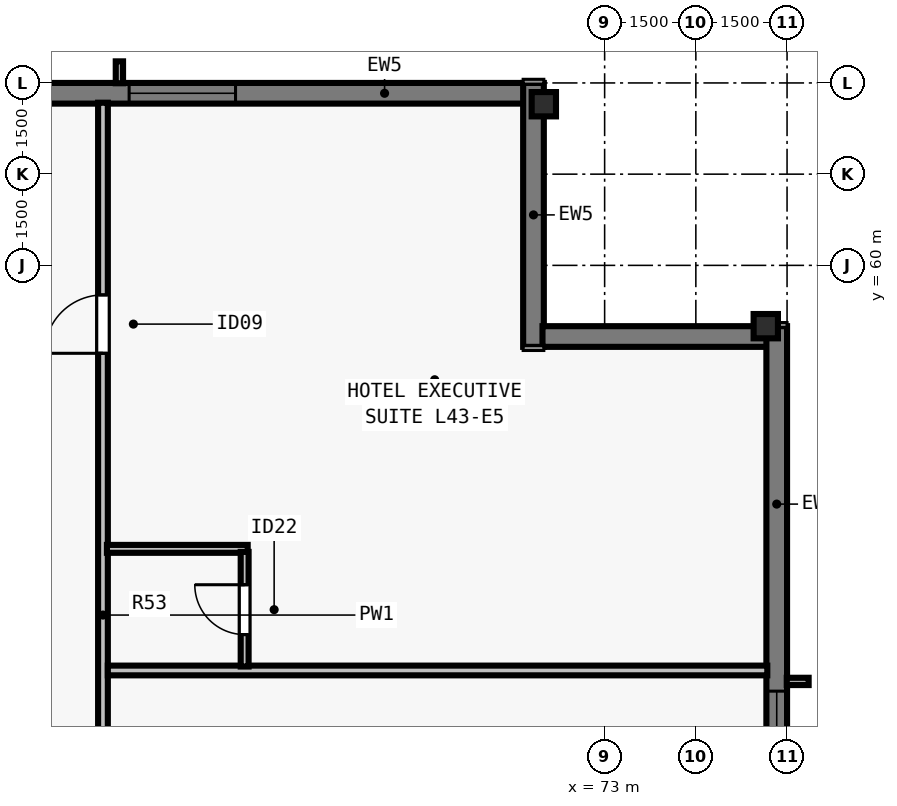
"""IFC4 building model, lengths in metres.
Left out: names, types, materials, properties, quantities, classifications, styles, units other than length and angle.
Written with IfcOpenShell. Run it as: python <this file> out.ifc"""

import sys

from ifc_helpers import new_model, si_unit, direction, frame, frame_2d, origin, origin_2d, place, context, subcontext, project, spatial, rectangle, i_section, extrude, element, fill, save


model = new_model("IFC4")
c1 = context("Model", 3, precision=1e-05, world=origin(), true_north=direction((0.0, 1.0)))
c2 = subcontext(c1, "Body", "Model", "MODEL_VIEW")
j1 = project(units=[si_unit("LENGTHUNIT", "METRE"), si_unit("PLANEANGLEUNIT", "RADIAN")], contexts=[c1])
p1 = place(None, origin())
s1 = spatial("IfcSite", under=j1, at=p1, CompositionType="ELEMENT")
p2 = place(p1, origin())
s2 = spatial("IfcBuilding", under=s1, at=p2, CompositionType="ELEMENT")
p3 = place(p2, frame((0.0, 0.0, 158.5)))
s3 = spatial("IfcBuildingStorey", under=s2, at=p3, CompositionType="ELEMENT", Elevation=158.5)
for number, where, z_axis, x_axis in (
    (1, (75.65, 59.0, 0.0), (0.0, 0.0, 1.0), (0.0, 1.0, 0.0)),
    (2, (72.0, 62.65, 0.0), (0.0, 0.0, 1.0), (1.0, 0.0, 0.0)),
):
    element("IfcColumn", number, at=place(p3, frame(where, z_axis=z_axis, x_axis=x_axis)), inside=s3, PredefinedType="COLUMN", context=c2, shape_type="SweptSolid", body=[
        extrude(i_section(OverallWidth=0.4, OverallDepth=0.4, WebThickness=0.022, FlangeThickness=0.036, at=origin_2d()), origin(), (0.0, 0.0, 1.0), 3.5),
    ])
p4 = place(p3, frame((32.0, 62.83, 0.0), z_axis=(0.0, 0.0, 1.0), x_axis=(1.0, 0.0, 0.0)))
e3 = element("IfcWall", 3, at=p4, inside=s3, PredefinedType="SOLIDWALL", context=c2, shape_type="SweptSolid", body=[
    extrude(rectangle(XDim=39.682, YDim=0.34, at=frame_2d((19.841, 0.0))), origin(), (0.0, 0.0, 1.0), 3.28),
])
p5 = place(p4, frame((3.902, 0.0, 0.8)))
e4 = element("IfcOpeningElement", 4, at=p5, cuts=e3, PredefinedType="OPENING", context=c2, shape_type="SweptSolid", body=[
    extrude(rectangle(XDim=1.75, YDim=1.66, at=frame_2d((0.875, 0.83))), frame((0.0, 0.18, 0.0), z_axis=(0.0, -1.0, 0.0), x_axis=(1.0, 0.0, 0.0)), (0.0, 0.0, 1.0), 0.36),
])
p6 = place(p4, frame((8.955, 0.0, 0.8)))
e5 = element("IfcOpeningElement", 5, at=p6, cuts=e3, PredefinedType="OPENING", context=c2, shape_type="SweptSolid", body=[
    extrude(rectangle(XDim=1.35, YDim=1.66, at=frame_2d((0.675, 0.83))), frame((0.0, 0.18, 0.0), z_axis=(0.0, -1.0, 0.0), x_axis=(1.0, 0.0, 0.0)), (0.0, 0.0, 1.0), 0.36),
])
p7 = place(p4, frame((11.859, 0.0, 0.8)))
e6 = element("IfcOpeningElement", 6, at=p7, cuts=e3, PredefinedType="OPENING", context=c2, shape_type="SweptSolid", body=[
    extrude(rectangle(XDim=1.75, YDim=1.66, at=frame_2d((0.875, 0.83))), frame((0.0, 0.18, 0.0), z_axis=(0.0, -1.0, 0.0), x_axis=(1.0, 0.0, 0.0)), (0.0, 0.0, 1.0), 0.36),
])
p8 = place(p4, frame((16.062, 0.0, 0.8)))
e7 = element("IfcOpeningElement", 7, at=p8, cuts=e3, PredefinedType="OPENING", context=c2, shape_type="SweptSolid", body=[
    extrude(rectangle(XDim=1.35, YDim=1.66, at=frame_2d((0.675, 0.83))), frame((0.0, 0.18, 0.0), z_axis=(0.0, -1.0, 0.0), x_axis=(1.0, 0.0, 0.0)), (0.0, 0.0, 1.0), 0.36),
])
p9 = place(p4, frame((18.966, 0.0, 0.8)))
e8 = element("IfcOpeningElement", 8, at=p9, cuts=e3, PredefinedType="OPENING", context=c2, shape_type="SweptSolid", body=[
    extrude(rectangle(XDim=1.75, YDim=1.66, at=frame_2d((0.875, 0.83))), frame((0.0, 0.18, 0.0), z_axis=(0.0, -1.0, 0.0), x_axis=(1.0, 0.0, 0.0)), (0.0, 0.0, 1.0), 0.36),
])
p10 = place(p4, frame((22.719, 0.0, 0.8)))
e9 = element("IfcOpeningElement", 9, at=p10, cuts=e3, PredefinedType="OPENING", context=c2, shape_type="SweptSolid", body=[
    extrude(rectangle(XDim=1.35, YDim=1.66, at=frame_2d((0.675, 0.83))), frame((0.0, 0.18, 0.0), z_axis=(0.0, -1.0, 0.0), x_axis=(1.0, 0.0, 0.0)), (0.0, 0.0, 1.0), 0.36),
])
p11 = place(p4, frame((26.073, 0.0, 0.8)))
e10 = element("IfcOpeningElement", 10, at=p11, cuts=e3, PredefinedType="OPENING", context=c2, shape_type="SweptSolid", body=[
    extrude(rectangle(XDim=1.75, YDim=1.66, at=frame_2d((0.875, 0.83))), frame((0.0, 0.18, 0.0), z_axis=(0.0, -1.0, 0.0), x_axis=(1.0, 0.0, 0.0)), (0.0, 0.0, 1.0), 0.36),
])
p12 = place(p4, frame((28.977, 0.0, 0.8)))
e11 = element("IfcOpeningElement", 11, at=p12, cuts=e3, PredefinedType="OPENING", context=c2, shape_type="SweptSolid", body=[
    extrude(rectangle(XDim=1.35, YDim=1.66, at=frame_2d((0.675, 0.83))), frame((0.0, 0.18, 0.0), z_axis=(0.0, -1.0, 0.0), x_axis=(1.0, 0.0, 0.0)), (0.0, 0.0, 1.0), 0.36),
])
p13 = place(p4, frame((33.18, 0.0, 0.8)))
e12 = element("IfcOpeningElement", 12, at=p13, cuts=e3, PredefinedType="OPENING", context=c2, shape_type="SweptSolid", body=[
    extrude(rectangle(XDim=1.75, YDim=1.66, at=frame_2d((0.875, 0.83))), frame((0.0, 0.18, 0.0), z_axis=(0.0, -1.0, 0.0), x_axis=(1.0, 0.0, 0.0)), (0.0, 0.0, 1.0), 0.36),
])
p14 = place(p3, frame((71.83, 63.0, 0.0), z_axis=(0.0, 0.0, 1.0), x_axis=(0.0, -1.0, 0.0)))
e13 = element("IfcWall", 13, at=p14, inside=s3, PredefinedType="SOLIDWALL", context=c2, shape_type="SweptSolid", body=[
    extrude(rectangle(XDim=4.34, YDim=0.34, at=frame_2d((2.17, 0.0))), origin(), (0.0, 0.0, 1.0), 3.28),
])
p15 = place(p3, frame((71.978, 58.83, 0.0), z_axis=(0.0, 0.0, 1.0), x_axis=(1.0, 0.0, 0.0)))
e14 = element("IfcWall", 14, at=p15, inside=s3, PredefinedType="SOLIDWALL", context=c2, shape_type="SweptSolid", body=[
    extrude(rectangle(XDim=3.704, YDim=0.34, at=frame_2d((1.852, 0.0))), origin(), (0.0, 0.0, 1.0), 3.28),
])
p16 = place(p3, frame((75.83, 59.0, 0.0), z_axis=(0.0, 0.0, 1.0), x_axis=(0.0, -1.0, 0.0)))
e15 = element("IfcWall", 15, at=p16, inside=s3, PredefinedType="SOLIDWALL", context=c2, shape_type="SweptSolid", body=[
    extrude(rectangle(XDim=39.682, YDim=0.34, at=frame_2d((19.841, 0.0))), origin(), (0.0, 0.0, 1.0), 3.28),
])
p17 = place(p16, frame((6.002, 0.0, 0.8)))
e16 = element("IfcOpeningElement", 16, at=p17, cuts=e15, PredefinedType="OPENING", context=c2, shape_type="SweptSolid", body=[
    extrude(rectangle(XDim=1.75, YDim=1.66, at=frame_2d((0.875, 0.83))), frame((0.0, 0.18, 0.0), z_axis=(0.0, -1.0, 0.0), x_axis=(1.0, 0.0, 0.0)), (0.0, 0.0, 1.0), 0.36),
])
p18 = place(p16, frame((8.505, 0.0, 0.8)))
e17 = element("IfcOpeningElement", 17, at=p18, cuts=e15, PredefinedType="OPENING", context=c2, shape_type="SweptSolid", body=[
    extrude(rectangle(XDim=1.35, YDim=1.66, at=frame_2d((0.675, 0.83))), frame((0.0, 0.18, 0.0), z_axis=(0.0, -1.0, 0.0), x_axis=(1.0, 0.0, 0.0)), (0.0, 0.0, 1.0), 0.36),
])
p19 = place(p16, frame((11.859, 0.0, 0.8)))
e18 = element("IfcOpeningElement", 18, at=p19, cuts=e15, PredefinedType="OPENING", context=c2, shape_type="SweptSolid", body=[
    extrude(rectangle(XDim=1.75, YDim=1.66, at=frame_2d((0.875, 0.83))), frame((0.0, 0.18, 0.0), z_axis=(0.0, -1.0, 0.0), x_axis=(1.0, 0.0, 0.0)), (0.0, 0.0, 1.0), 0.36),
])
p20 = place(p16, frame((16.062, 0.0, 0.8)))
e19 = element("IfcOpeningElement", 19, at=p20, cuts=e15, PredefinedType="OPENING", context=c2, shape_type="SweptSolid", body=[
    extrude(rectangle(XDim=1.35, YDim=1.66, at=frame_2d((0.675, 0.83))), frame((0.0, 0.18, 0.0), z_axis=(0.0, -1.0, 0.0), x_axis=(1.0, 0.0, 0.0)), (0.0, 0.0, 1.0), 0.36),
])
p21 = place(p16, frame((18.966, 0.0, 0.8)))
e20 = element("IfcOpeningElement", 20, at=p21, cuts=e15, PredefinedType="OPENING", context=c2, shape_type="SweptSolid", body=[
    extrude(rectangle(XDim=1.75, YDim=1.66, at=frame_2d((0.875, 0.83))), frame((0.0, 0.18, 0.0), z_axis=(0.0, -1.0, 0.0), x_axis=(1.0, 0.0, 0.0)), (0.0, 0.0, 1.0), 0.36),
])
p22 = place(p16, frame((22.719, 0.0, 0.8)))
e21 = element("IfcOpeningElement", 21, at=p22, cuts=e15, PredefinedType="OPENING", context=c2, shape_type="SweptSolid", body=[
    extrude(rectangle(XDim=1.35, YDim=1.66, at=frame_2d((0.675, 0.83))), frame((0.0, 0.18, 0.0), z_axis=(0.0, -1.0, 0.0), x_axis=(1.0, 0.0, 0.0)), (0.0, 0.0, 1.0), 0.36),
])
p23 = place(p16, frame((26.073, 0.0, 0.8)))
e22 = element("IfcOpeningElement", 22, at=p23, cuts=e15, PredefinedType="OPENING", context=c2, shape_type="SweptSolid", body=[
    extrude(rectangle(XDim=1.75, YDim=1.66, at=frame_2d((0.875, 0.83))), frame((0.0, 0.18, 0.0), z_axis=(0.0, -1.0, 0.0), x_axis=(1.0, 0.0, 0.0)), (0.0, 0.0, 1.0), 0.36),
])
p24 = place(p16, frame((29.827, 0.0, 0.8)))
e23 = element("IfcOpeningElement", 23, at=p24, cuts=e15, PredefinedType="OPENING", context=c2, shape_type="SweptSolid", body=[
    extrude(rectangle(XDim=1.35, YDim=1.66, at=frame_2d((0.675, 0.83))), frame((0.0, 0.18, 0.0), z_axis=(0.0, -1.0, 0.0), x_axis=(1.0, 0.0, 0.0)), (0.0, 0.0, 1.0), 0.36),
])
p25 = place(p16, frame((32.33, 0.0, 0.8)))
e24 = element("IfcOpeningElement", 24, at=p25, cuts=e15, PredefinedType="OPENING", context=c2, shape_type="SweptSolid", body=[
    extrude(rectangle(XDim=1.75, YDim=1.66, at=frame_2d((0.875, 0.83))), frame((0.0, 0.18, 0.0), z_axis=(0.0, -1.0, 0.0), x_axis=(1.0, 0.0, 0.0)), (0.0, 0.0, 1.0), 0.36),
])
p26 = place(p16, frame((34.79, 0.0, 0.8)))
e25 = element("IfcOpeningElement", 25, at=p26, cuts=e15, PredefinedType="OPENING", context=c2, shape_type="SweptSolid", body=[
    extrude(rectangle(XDim=0.9, YDim=1.66, at=frame_2d((0.45, 0.83))), frame((0.0, 0.18, 0.0), z_axis=(0.0, -1.0, 0.0), x_axis=(1.0, 0.0, 0.0)), (0.0, 0.0, 1.0), 0.36),
])
p27 = place(p3, frame((64.75, 15.325, 0.0), z_axis=(0.0, 0.0, 1.0), x_axis=(0.0, 1.0, 0.0)))
e26 = element("IfcWall", 26, at=p27, inside=s3, PredefinedType="PARTITIONING", context=c2, shape_type="SweptSolid", body=[
    extrude(rectangle(XDim=47.35, YDim=0.16, at=frame_2d((23.675, 0.0))), origin(), (0.0, 0.0, 1.0), 2.555),
])
p28 = place(p27, frame((5.494, 0.0, 0.0)))
e27 = element("IfcOpeningElement", 27, at=p28, cuts=e26, PredefinedType="OPENING", context=c2, shape_type="SweptSolid", body=[
    extrude(rectangle(XDim=0.96, YDim=2.15, at=frame_2d((0.48, 1.075))), frame((0.0, 0.09, 0.0), z_axis=(0.0, -1.0, 0.0), x_axis=(1.0, 0.0, 0.0)), (0.0, 0.0, 1.0), 0.18),
])
p29 = place(p27, frame((14.796, 0.0, 0.0)))
e28 = element("IfcOpeningElement", 28, at=p29, cuts=e26, PredefinedType="OPENING", context=c2, shape_type="SweptSolid", body=[
    extrude(rectangle(XDim=0.96, YDim=2.15, at=frame_2d((0.48, 1.075))), frame((0.0, 0.09, 0.0), z_axis=(0.0, -1.0, 0.0), x_axis=(1.0, 0.0, 0.0)), (0.0, 0.0, 1.0), 0.18),
])
p30 = place(p27, frame((24.228, 0.0, 0.0)))
e29 = element("IfcOpeningElement", 29, at=p30, cuts=e26, PredefinedType="OPENING", context=c2, shape_type="SweptSolid", body=[
    extrude(rectangle(XDim=0.96, YDim=2.15, at=frame_2d((0.48, 1.075))), frame((0.0, 0.09, 0.0), z_axis=(0.0, -1.0, 0.0), x_axis=(1.0, 0.0, 0.0)), (0.0, 0.0, 1.0), 0.18),
])
p31 = place(p27, frame((33.66, 0.0, 0.0)))
e30 = element("IfcOpeningElement", 30, at=p31, cuts=e26, PredefinedType="OPENING", context=c2, shape_type="SweptSolid", body=[
    extrude(rectangle(XDim=0.96, YDim=2.15, at=frame_2d((0.48, 1.075))), frame((0.0, 0.09, 0.0), z_axis=(0.0, -1.0, 0.0), x_axis=(1.0, 0.0, 0.0)), (0.0, 0.0, 1.0), 0.18),
])
p32 = place(p27, frame((43.229, 0.0, 0.0)))
e31 = element("IfcOpeningElement", 31, at=p32, cuts=e26, PredefinedType="OPENING", context=c2, shape_type="SweptSolid", body=[
    extrude(rectangle(XDim=0.96, YDim=2.15, at=frame_2d((0.48, 1.075))), frame((0.0, 0.09, 0.0), z_axis=(0.0, -1.0, 0.0), x_axis=(1.0, 0.0, 0.0)), (0.0, 0.0, 1.0), 0.18),
])
p33 = place(p3, frame((64.83, 53.338, 0.0), z_axis=(0.0, 0.0, 1.0), x_axis=(1.0, 0.0, 0.0)))
e32 = element("IfcWall", 32, at=p33, inside=s3, PredefinedType="PARTITIONING", context=c2, shape_type="SweptSolid", body=[
    extrude(rectangle(XDim=10.845, YDim=0.16, at=frame_2d((5.422, 0.0))), origin(), (0.0, 0.0, 1.0), 2.896),
])
p34 = place(p3, frame((64.815, 55.338, 0.0), z_axis=(0.0, 0.0, 1.0), x_axis=(1.0, 0.0, 0.0)))
e33 = element("IfcWall", 33, at=p34, inside=s3, PredefinedType="PLUMBINGWALL", context=c2, shape_type="SweptSolid", body=[
    extrude(rectangle(XDim=2.315, YDim=0.13, at=frame_2d((1.157, 0.0))), origin(), (0.0, 0.0, 1.0), 3.28),
])
p35 = place(p3, frame((67.08, 53.403, 0.0), z_axis=(0.0, 0.0, 1.0), x_axis=(0.0, 1.0, 0.0)))
e34 = element("IfcWall", 34, at=p35, inside=s3, PredefinedType="PLUMBINGWALL", context=c2, shape_type="SweptSolid", body=[
    extrude(rectangle(XDim=1.885, YDim=0.13, at=frame_2d((0.942, 0.0))), origin(), (0.0, 0.0, 1.0), 3.28),
])
p36 = place(p35, frame((0.525, 0.0, 0.0)))
e35 = element("IfcOpeningElement", 35, at=p36, cuts=e34, PredefinedType="OPENING", context=c2, shape_type="SweptSolid", body=[
    extrude(rectangle(XDim=0.82, YDim=2.1, at=frame_2d((0.41, 1.05))), frame((0.0, 0.075, 0.0), z_axis=(0.0, -1.0, 0.0), x_axis=(1.0, 0.0, 0.0)), (0.0, 0.0, 1.0), 0.15),
])
p37 = place(p13, origin())
e36 = element("IfcWindow", 36, at=p37, inside=s3, PartitioningType="SINGLE_PANEL", PredefinedType="WINDOW", context=c2, shape_type="SweptSolid", body=[
    extrude(rectangle(XDim=1.75, YDim=1.66, at=frame_2d((0.875, 0.83))), frame((0.0, -0.05, 0.0), z_axis=(0.0, -1.0, 0.0), x_axis=(1.0, 0.0, 0.0)), (0.0, 0.0, 1.0), 0.06),
])
fill(e12, e36)
p38 = place(p17, origin())
e37 = element("IfcWindow", 37, at=p38, inside=s3, PartitioningType="SINGLE_PANEL", PredefinedType="WINDOW", context=c2, shape_type="SweptSolid", body=[
    extrude(rectangle(XDim=1.75, YDim=1.66, at=frame_2d((0.875, 0.83))), frame((0.0, -0.05, 0.0), z_axis=(0.0, -1.0, 0.0), x_axis=(1.0, 0.0, 0.0)), (0.0, 0.0, 1.0), 0.06),
])
fill(e16, e37)
p39 = place(p36, origin())
e38 = element("IfcDoor", 38, at=p39, inside=s3, OperationType="SINGLE_SWING_RIGHT", PredefinedType="DOOR", context=c2, shape_type="SweptSolid", body=[
    extrude(rectangle(XDim=0.82, YDim=2.1, at=frame_2d((0.41, 1.05))), frame((0.0, 0.025, 0.0), z_axis=(0.0, -1.0, 0.0), x_axis=(1.0, 0.0, 0.0)), (0.0, 0.0, 1.0), 0.05),
])
fill(e35, e38)
p40 = place(p32, origin())
e39 = element("IfcDoor", 39, at=p40, inside=s3, OperationType="SINGLE_SWING_LEFT", PredefinedType="DOOR", context=c2, shape_type="SweptSolid", body=[
    extrude(rectangle(XDim=0.96, YDim=2.15, at=frame_2d((0.48, 1.075))), frame((0.0, 0.025, 0.0), z_axis=(0.0, -1.0, 0.0), x_axis=(1.0, 0.0, 0.0)), (0.0, 0.0, 1.0), 0.05),
])
fill(e31, e39)
save(model, sys.argv[1])
